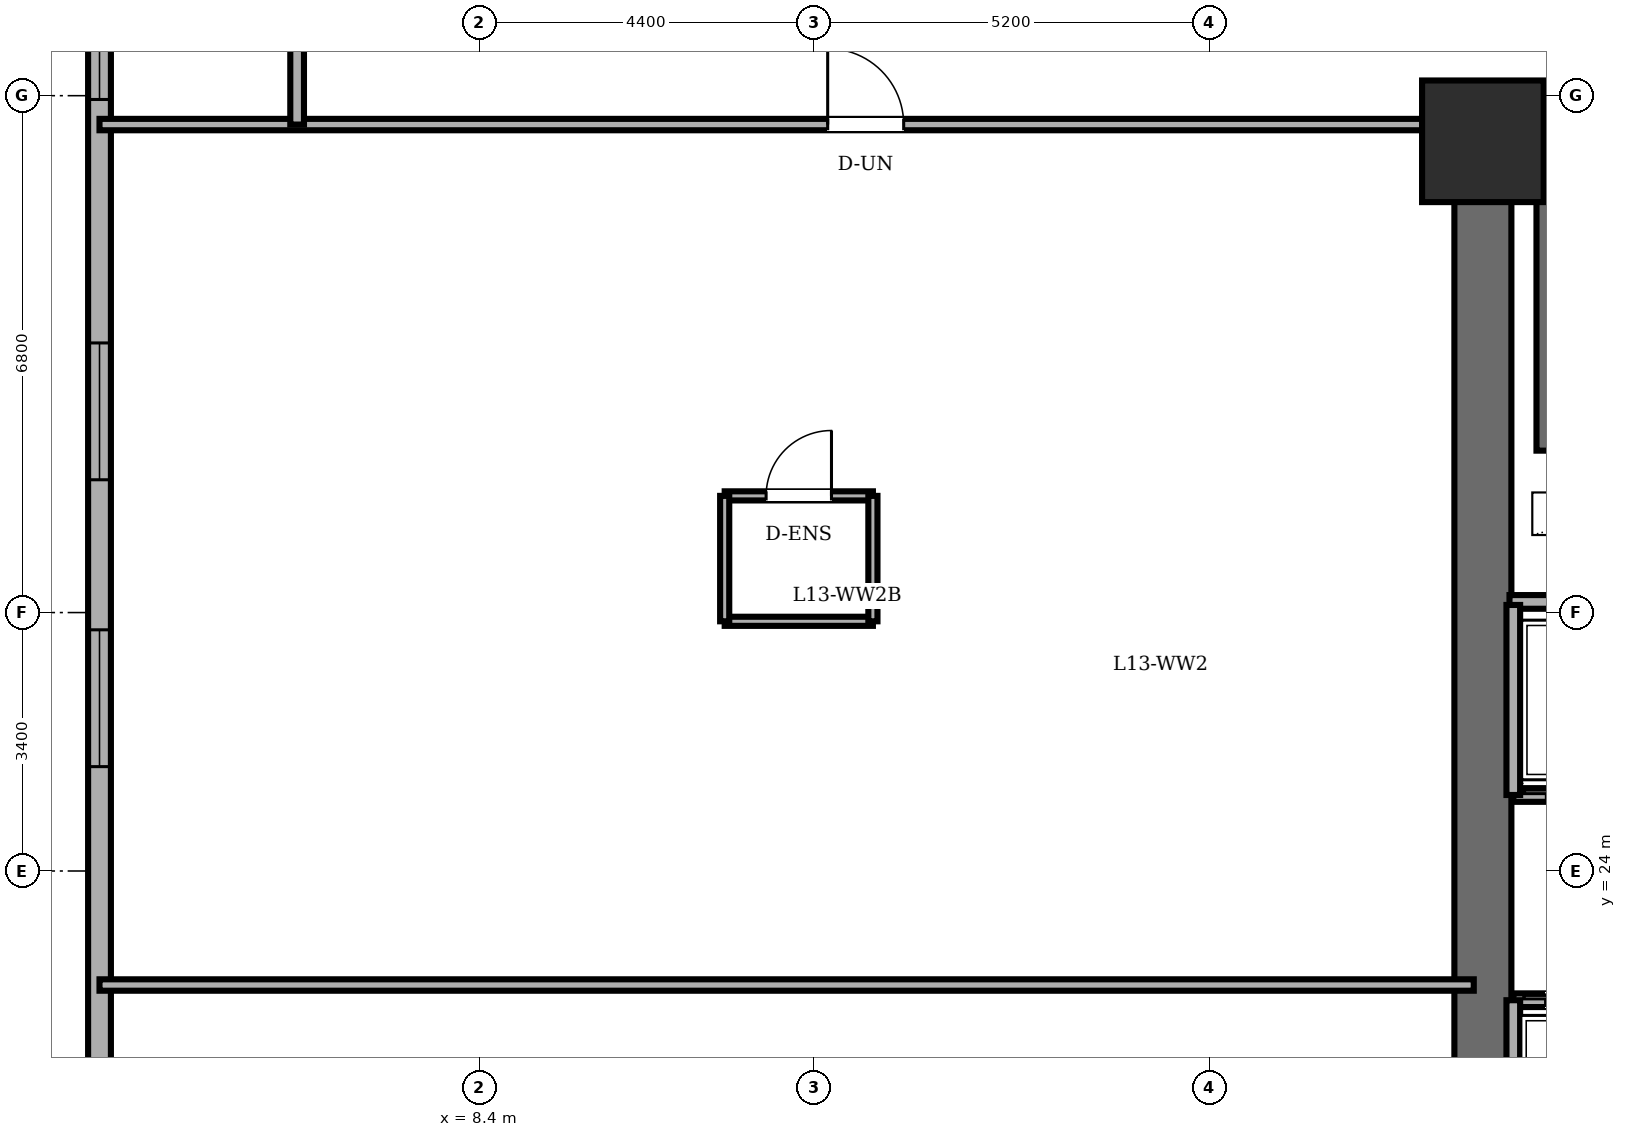
"""IFC4 building model, lengths in metres.
Left out: names, types, materials, properties, quantities, classifications, styles, units other than length and angle.
Written with IfcOpenShell. Run it as: python <this file> out.ifc"""

import sys

from ifc_helpers import new_model, si_unit, direction, frame, frame_2d, origin, origin_2d, place, context, subcontext, project, spatial, rectangle, extrude, element, fill, save


model = new_model("IFC4")
c1 = context("Model", 3, precision=1e-05, world=origin(), true_north=direction((0.0, 1.0)))
c2 = subcontext(c1, "Body", "Model", "MODEL_VIEW")
j1 = project(units=[si_unit("LENGTHUNIT", "METRE"), si_unit("PLANEANGLEUNIT", "RADIAN")], contexts=[c1])
p1 = place(None, origin())
s1 = spatial("IfcSite", under=j1, at=p1, CompositionType="ELEMENT")
p2 = place(p1, origin())
s2 = spatial("IfcBuilding", under=s1, at=p2, CompositionType="ELEMENT")
p3 = place(p2, frame((0.0, 0.0, 50.4)))
s3 = spatial("IfcBuildingStorey", under=s2, at=p3, CompositionType="ELEMENT", Elevation=50.4)
p4 = place(p3, frame((21.6, 33.6, 0.0), z_axis=(0.0, 0.0, 1.0), x_axis=(1.0, 0.0, 0.0)))
e1 = element("IfcColumn", 1, at=p4, inside=s3, PredefinedType="COLUMN", context=c2, shape_type="SweptSolid", body=[
    extrude(rectangle(XDim=1.6, YDim=1.6, at=origin_2d()), origin(), (0.0, 0.0, 1.0), 3.6),
])
p5 = place(p3, frame((3.4, 40.2, 0.0), z_axis=(0.0, 0.0, 1.0), x_axis=(0.0, -1.0, 0.0)))
e2 = element("IfcWall", 2, at=p5, inside=s3, PredefinedType="SOLIDWALL", context=c2, shape_type="SweptSolid", body=[
    extrude(rectangle(XDim=32.4, YDim=0.3, at=frame_2d((16.2, 0.0))), origin(), (0.0, 0.0, 1.0), 3.4),
])
p6 = place(p5, frame((1.235, 0.0, 0.85)))
e3 = element("IfcOpeningElement", 3, at=p6, cuts=e2, PredefinedType="OPENING", context=c2, shape_type="SweptSolid", body=[
    extrude(rectangle(XDim=1.8, YDim=1.55, at=frame_2d((0.9, 0.775))), frame((0.0, 0.16, 0.0), z_axis=(0.0, -1.0, 0.0), x_axis=(1.0, 0.0, 0.0)), (0.0, 0.0, 1.0), 0.32),
])
p7 = place(p5, frame((4.25, 0.0, 0.85)))
e4 = element("IfcOpeningElement", 4, at=p7, cuts=e2, PredefinedType="OPENING", context=c2, shape_type="SweptSolid", body=[
    extrude(rectangle(XDim=1.8, YDim=1.55, at=frame_2d((0.9, 0.775))), frame((0.0, 0.16, 0.0), z_axis=(0.0, -1.0, 0.0), x_axis=(1.0, 0.0, 0.0)), (0.0, 0.0, 1.0), 0.32),
])
p8 = place(p5, frame((9.253, 0.0, 0.85)))
e5 = element("IfcOpeningElement", 5, at=p8, cuts=e2, PredefinedType="OPENING", context=c2, shape_type="SweptSolid", body=[
    extrude(rectangle(XDim=1.8, YDim=1.55, at=frame_2d((0.9, 0.775))), frame((0.0, 0.16, 0.0), z_axis=(0.0, -1.0, 0.0), x_axis=(1.0, 0.0, 0.0)), (0.0, 0.0, 1.0), 0.32),
])
p9 = place(p5, frame((13.027, 0.0, 0.85)))
e6 = element("IfcOpeningElement", 6, at=p9, cuts=e2, PredefinedType="OPENING", context=c2, shape_type="SweptSolid", body=[
    extrude(rectangle(XDim=1.8, YDim=1.55, at=frame_2d((0.9, 0.775))), frame((0.0, 0.16, 0.0), z_axis=(0.0, -1.0, 0.0), x_axis=(1.0, 0.0, 0.0)), (0.0, 0.0, 1.0), 0.32),
])
p10 = place(p5, frame((19.573, 0.0, 0.85)))
e7 = element("IfcOpeningElement", 7, at=p10, cuts=e2, PredefinedType="OPENING", context=c2, shape_type="SweptSolid", body=[
    extrude(rectangle(XDim=1.8, YDim=1.55, at=frame_2d((0.9, 0.775))), frame((0.0, 0.16, 0.0), z_axis=(0.0, -1.0, 0.0), x_axis=(1.0, 0.0, 0.0)), (0.0, 0.0, 1.0), 0.32),
])
p11 = place(p5, frame((22.347, 0.0, 0.85)))
e8 = element("IfcOpeningElement", 8, at=p11, cuts=e2, PredefinedType="OPENING", context=c2, shape_type="SweptSolid", body=[
    extrude(rectangle(XDim=1.8, YDim=1.55, at=frame_2d((0.9, 0.775))), frame((0.0, 0.16, 0.0), z_axis=(0.0, -1.0, 0.0), x_axis=(1.0, 0.0, 0.0)), (0.0, 0.0, 1.0), 0.32),
])
p12 = place(p5, frame((26.35, 0.0, 0.85)))
e9 = element("IfcOpeningElement", 9, at=p12, cuts=e2, PredefinedType="OPENING", context=c2, shape_type="SweptSolid", body=[
    extrude(rectangle(XDim=1.8, YDim=1.55, at=frame_2d((0.9, 0.775))), frame((0.0, 0.16, 0.0), z_axis=(0.0, -1.0, 0.0), x_axis=(1.0, 0.0, 0.0)), (0.0, 0.0, 1.0), 0.32),
])
p13 = place(p5, frame((29.365, 0.0, 0.85)))
e10 = element("IfcOpeningElement", 10, at=p13, cuts=e2, PredefinedType="OPENING", context=c2, shape_type="SweptSolid", body=[
    extrude(rectangle(XDim=1.8, YDim=1.55, at=frame_2d((0.9, 0.775))), frame((0.0, 0.16, 0.0), z_axis=(0.0, -1.0, 0.0), x_axis=(1.0, 0.0, 0.0)), (0.0, 0.0, 1.0), 0.32),
])
p14 = place(p3, frame((21.6, 14.4, 0.0), z_axis=(0.0, 0.0, 1.0), x_axis=(0.0, 1.0, 0.0)))
e11 = element("IfcWall", 11, at=p14, inside=s3, PredefinedType="SHEAR", context=c2, shape_type="SweptSolid", body=[
    extrude(rectangle(XDim=19.2, YDim=0.75, at=frame_2d((9.6, 0.0))), origin(), (0.0, 0.0, 1.0), 3.4),
])
p15 = place(p3, frame((21.6, 33.6, 0.0), z_axis=(0.0, 0.0, 1.0), x_axis=(1.0, 0.0, 0.0)))
e12 = element("IfcWall", 12, at=p15, inside=s3, PredefinedType="SHEAR", context=c2, shape_type="SweptSolid", body=[
    extrude(rectangle(XDim=15.6, YDim=0.75, at=frame_2d((7.8, 0.0))), origin(), (0.0, 0.0, 1.0), 3.4),
])
p16 = place(p3, frame((22.48, 29.53, 0.0), z_axis=(0.0, 0.0, 1.0), x_axis=(0.0, 1.0, 0.0)))
e13 = element("IfcWall", 13, at=p16, inside=s3, PredefinedType="SOLIDWALL", context=c2, shape_type="SweptSolid", body=[
    extrude(rectangle(XDim=3.58, YDim=0.35, at=frame_2d((1.79, 0.0))), origin(), (0.0, 0.0, 1.0), 3.4),
])
p17 = place(p3, frame((21.95, 27.54, 0.0), z_axis=(0.0, 0.0, 1.0), x_axis=(1.0, 0.0, 0.0)))
e14 = element("IfcWall", 14, at=p17, inside=s3, PredefinedType="PARTITIONING", context=c2, shape_type="SweptSolid", body=[
    extrude(rectangle(XDim=10.56, YDim=0.18, at=frame_2d((5.28, 0.0))), origin(), (0.0, 0.0, 1.0), 3.4),
])
p18 = place(p3, frame((24.02, 25.0, 0.0), z_axis=(0.0, 0.0, 1.0), x_axis=(-1.0, 0.0, 0.0)))
e15 = element("IfcWall", 15, at=p18, inside=s3, PredefinedType="PARTITIONING", context=c2, shape_type="SweptSolid", body=[
    extrude(rectangle(XDim=2.02, YDim=0.18, at=frame_2d((1.01, 0.0))), origin(), (0.0, 0.0, 1.0), 3.4),
])
p19 = place(p18, frame((0.435, 0.0, 0.0)))
e16 = element("IfcOpeningElement", 16, at=p19, cuts=e15, PredefinedType="OPENING", context=c2, shape_type="SweptSolid", body=[
    extrude(rectangle(XDim=1.15, YDim=2.2, at=frame_2d((0.575, 1.1))), frame((0.0, 0.1, 0.0), z_axis=(0.0, -1.0, 0.0), x_axis=(1.0, 0.0, 0.0)), (0.0, 0.0, 1.0), 0.2),
])
p20 = place(p3, frame((22.0, 27.5, 0.0), z_axis=(0.0, 0.0, 1.0), x_axis=(0.0, -1.0, 0.0)))
e17 = element("IfcWall", 17, at=p20, inside=s3, PredefinedType="PARTITIONING", context=c2, shape_type="SweptSolid", body=[
    extrude(rectangle(XDim=2.5, YDim=0.18, at=frame_2d((1.25, 0.0))), origin(), (0.0, 0.0, 1.0), 3.4),
])
p21 = place(p3, frame((22.0, 22.3, 0.0), z_axis=(0.0, 0.0, 1.0), x_axis=(1.0, 0.0, 0.0)))
e18 = element("IfcWall", 18, at=p21, inside=s3, PredefinedType="PARTITIONING", context=c2, shape_type="SweptSolid", body=[
    extrude(rectangle(XDim=2.0, YDim=0.18, at=frame_2d((1.0, 0.0))), origin(), (0.0, 0.0, 1.0), 3.4),
])
p22 = place(p21, frame((0.425, 0.0, 0.0)))
e19 = element("IfcOpeningElement", 19, at=p22, cuts=e18, PredefinedType="OPENING", context=c2, shape_type="SweptSolid", body=[
    extrude(rectangle(XDim=1.15, YDim=2.2, at=frame_2d((0.575, 1.1))), frame((0.0, 0.1, 0.0), z_axis=(0.0, -1.0, 0.0), x_axis=(1.0, 0.0, 0.0)), (0.0, 0.0, 1.0), 0.2),
])
p23 = place(p3, frame((22.0, 22.3, 0.0), z_axis=(0.0, 0.0, 1.0), x_axis=(0.0, -1.0, 0.0)))
e20 = element("IfcWall", 20, at=p23, inside=s3, PredefinedType="PARTITIONING", context=c2, shape_type="SweptSolid", body=[
    extrude(rectangle(XDim=2.5, YDim=0.18, at=frame_2d((1.25, 0.0))), origin(), (0.0, 0.0, 1.0), 3.4),
])
p24 = place(p3, frame((11.625, 28.935, 0.0), z_axis=(0.0, 0.0, 1.0), x_axis=(1.0, 0.0, 0.0)))
e21 = element("IfcWall", 21, at=p24, inside=s3, PredefinedType="PARTITIONING", context=c2, shape_type="SweptSolid", body=[
    extrude(rectangle(XDim=1.95, YDim=0.12, at=frame_2d((0.975, 0.0))), origin(), (0.0, 0.0, 1.0), 3.4),
])
p25 = place(p24, frame((0.545, 0.0, 0.0)))
e22 = element("IfcOpeningElement", 22, at=p25, cuts=e21, PredefinedType="OPENING", context=c2, shape_type="SweptSolid", body=[
    extrude(rectangle(XDim=0.86, YDim=2.1, at=frame_2d((0.43, 1.05))), frame((0.0, 0.07, 0.0), z_axis=(0.0, -1.0, 0.0), x_axis=(1.0, 0.0, 0.0)), (0.0, 0.0, 1.0), 0.14),
])
p26 = place(p3, frame((13.575, 27.285, 0.0), z_axis=(0.0, 0.0, 1.0), x_axis=(-1.0, 0.0, 0.0)))
e23 = element("IfcWall", 23, at=p26, inside=s3, PredefinedType="PARTITIONING", context=c2, shape_type="SweptSolid", body=[
    extrude(rectangle(XDim=1.95, YDim=0.12, at=frame_2d((0.975, 0.0))), origin(), (0.0, 0.0, 1.0), 3.4),
])
for number, where, z_axis, x_axis in (
    (24, (11.625, 28.935, 0.0), (0.0, 0.0, 1.0), (0.0, -1.0, 0.0)),
    (25, (13.575, 27.285, 0.0), (0.0, 0.0, 1.0), (0.0, 1.0, 0.0)),
):
    element("IfcWall", number, at=place(p3, frame(where, z_axis=z_axis, x_axis=x_axis)), inside=s3, PredefinedType="PARTITIONING", context=c2, shape_type="SweptSolid", body=[
        extrude(rectangle(XDim=1.65, YDim=0.12, at=frame_2d((0.825, 0.0))), origin(), (0.0, 0.0, 1.0), 3.4),
    ])
p27 = place(p3, frame((3.4, 22.5, 0.0), z_axis=(0.0, 0.0, 1.0), x_axis=(1.0, 0.0, 0.0)))
e26 = element("IfcWall", 26, at=p27, inside=s3, PredefinedType="PARTITIONING", context=c2, shape_type="SweptSolid", body=[
    extrude(rectangle(XDim=18.08, YDim=0.15, at=frame_2d((9.04, 0.0))), origin(), (0.0, 0.0, 1.0), 3.4),
])
p28 = place(p3, frame((3.4, 33.82, 0.0), z_axis=(0.0, 0.0, 1.0), x_axis=(1.0, 0.0, 0.0)))
e27 = element("IfcWall", 27, at=p28, inside=s3, PredefinedType="PARTITIONING", context=c2, shape_type="SweptSolid", body=[
    extrude(rectangle(XDim=18.08, YDim=0.15, at=frame_2d((9.04, 0.0))), origin(), (0.0, 0.0, 1.0), 3.4),
])
p29 = place(p28, frame((9.58, 0.0, 0.0)))
e28 = element("IfcOpeningElement", 28, at=p29, cuts=e27, PredefinedType="OPENING", context=c2, shape_type="SweptSolid", body=[
    extrude(rectangle(XDim=1.0, YDim=2.15, at=frame_2d((0.5, 1.075))), frame((0.0, 0.085, 0.0), z_axis=(0.0, -1.0, 0.0), x_axis=(1.0, 0.0, 0.0)), (0.0, 0.0, 1.0), 0.17),
])
p30 = place(p3, frame((6.0, 33.82, 0.0), z_axis=(0.0, 0.0, 1.0), x_axis=(0.0, 1.0, 0.0)))
e29 = element("IfcWall", 29, at=p30, inside=s3, PredefinedType="PARTITIONING", context=c2, shape_type="SweptSolid", body=[
    extrude(rectangle(XDim=2.46, YDim=0.18, at=frame_2d((1.23, 0.0))), origin(), (0.0, 0.0, 1.0), 3.4),
])
p31 = place(p7, origin())
e30 = element("IfcWindow", 30, at=p31, inside=s3, PartitioningType="DOUBLE_PANEL_VERTICAL", PredefinedType="WINDOW", context=c2, shape_type="SweptSolid", body=[
    extrude(rectangle(XDim=1.8, YDim=1.55, at=frame_2d((0.9, 0.775))), frame((0.0, 0.03, 0.0), z_axis=(0.0, -1.0, 0.0), x_axis=(1.0, 0.0, 0.0)), (0.0, 0.0, 1.0), 0.06),
])
fill(e4, e30)
p32 = place(p8, origin())
e31 = element("IfcWindow", 31, at=p32, inside=s3, PartitioningType="DOUBLE_PANEL_VERTICAL", PredefinedType="WINDOW", context=c2, shape_type="SweptSolid", body=[
    extrude(rectangle(XDim=1.8, YDim=1.55, at=frame_2d((0.9, 0.775))), frame((0.0, 0.03, 0.0), z_axis=(0.0, -1.0, 0.0), x_axis=(1.0, 0.0, 0.0)), (0.0, 0.0, 1.0), 0.06),
])
fill(e5, e31)
p33 = place(p9, origin())
e32 = element("IfcWindow", 32, at=p33, inside=s3, PartitioningType="DOUBLE_PANEL_VERTICAL", PredefinedType="WINDOW", context=c2, shape_type="SweptSolid", body=[
    extrude(rectangle(XDim=1.8, YDim=1.55, at=frame_2d((0.9, 0.775))), frame((0.0, 0.03, 0.0), z_axis=(0.0, -1.0, 0.0), x_axis=(1.0, 0.0, 0.0)), (0.0, 0.0, 1.0), 0.06),
])
fill(e6, e32)
p34 = place(p22, origin())
e33 = element("IfcDoor", 33, at=p34, inside=s3, OperationType="DOUBLE_DOOR_SLIDING", PredefinedType="DOOR", context=c2, shape_type="SweptSolid", body=[
    extrude(rectangle(XDim=1.15, YDim=2.2, at=frame_2d((0.575, 1.1))), frame((0.0, 0.025, 0.0), z_axis=(0.0, -1.0, 0.0), x_axis=(1.0, 0.0, 0.0)), (0.0, 0.0, 1.0), 0.05),
])
fill(e19, e33)
p35 = place(p25, origin())
e34 = element("IfcDoor", 34, at=p35, inside=s3, OperationType="SINGLE_SWING_RIGHT", PredefinedType="DOOR", context=c2, shape_type="SweptSolid", body=[
    extrude(rectangle(XDim=0.86, YDim=2.1, at=frame_2d((0.43, 1.05))), frame((0.0, 0.025, 0.0), z_axis=(0.0, -1.0, 0.0), x_axis=(1.0, 0.0, 0.0)), (0.0, 0.0, 1.0), 0.05),
])
fill(e22, e34)
p36 = place(p29, origin())
e35 = element("IfcDoor", 35, at=p36, inside=s3, OperationType="SINGLE_SWING_LEFT", PredefinedType="DOOR", context=c2, shape_type="SweptSolid", body=[
    extrude(rectangle(XDim=1.0, YDim=2.15, at=frame_2d((0.5, 1.075))), frame((0.0, 0.025, 0.0), z_axis=(0.0, -1.0, 0.0), x_axis=(1.0, 0.0, 0.0)), (0.0, 0.0, 1.0), 0.05),
])
fill(e28, e35)
save(model, sys.argv[1])
